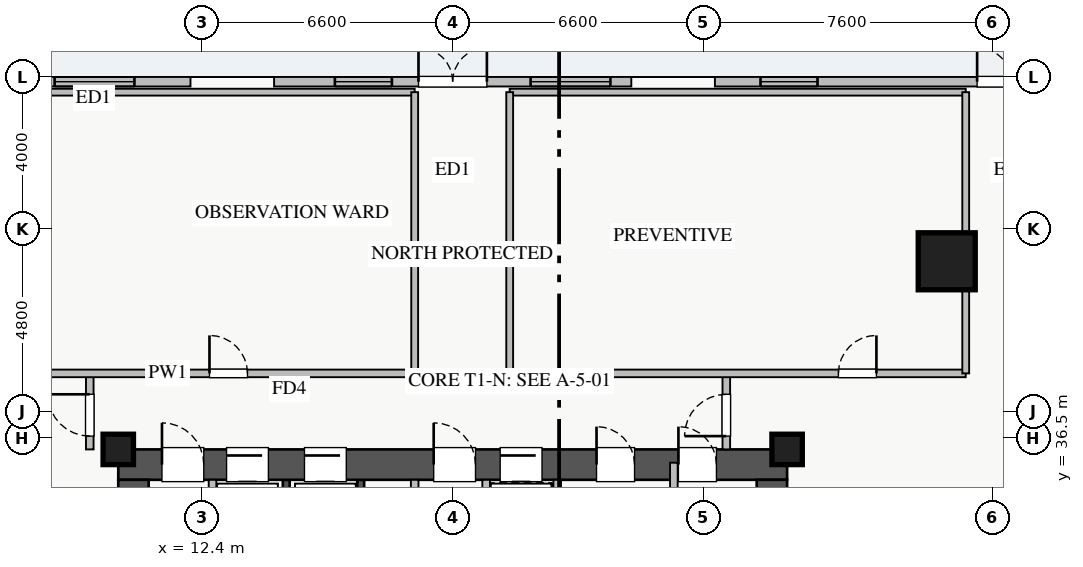
"""IFC4 building model, lengths in metres.
Left out: names, types, materials, properties, quantities, classifications, styles, units other than length and angle.
Written with IfcOpenShell. Run it as: python <this file> out.ifc"""

import sys

from ifc_helpers import new_model, si_unit, direction, frame, frame_2d, origin, origin_2d, place, context, subcontext, project, spatial, rectangle, extrude, source, transform, mapped, element, fill, save


model = new_model("IFC4")
c1 = context("Model", 3, precision=1e-05, world=origin(), true_north=direction((0.0, 1.0)))
c2 = subcontext(c1, "Body", "Model", "MODEL_VIEW")
j1 = project(units=[si_unit("LENGTHUNIT", "METRE"), si_unit("PLANEANGLEUNIT", "RADIAN")], contexts=[c1])
p1 = place(None, origin())
s1 = spatial("IfcSite", under=j1, at=p1, CompositionType="ELEMENT")
p2 = place(p1, origin())
s2 = spatial("IfcBuilding", under=s1, at=p2, CompositionType="ELEMENT")
p3 = place(p2, origin())
s3 = spatial("IfcBuildingStorey", under=s2, at=p3, CompositionType="ELEMENT", Elevation=0.0)
for number, where, z_axis, x_axis in (
    (1, (14.62, 33.2, 0.0), (0.0, 0.0, 1.0), (0.0, 1.0, 0.0)),
    (2, (16.58, 33.2, 0.0), (0.0, 0.0, 1.0), (0.0, 1.0, 0.0)),
):
    element("IfcWall", number, at=place(p3, frame(where, z_axis=z_axis, x_axis=x_axis)), inside=s3, PredefinedType="SHEAR", context=c2, shape_type="SweptSolid", body=[
        extrude(rectangle(XDim=2.2, YDim=0.18, at=frame_2d((1.1, 0.0))), origin(), (0.0, 0.0, 1.0), 4.78),
    ])
p4 = place(p3, frame((10.2, 35.8, 0.0), z_axis=(0.0, 0.0, 1.0), x_axis=(1.0, 0.0, 0.0)))
e3 = element("IfcWall", 3, at=p4, inside=s3, PredefinedType="SHEAR", context=c2, shape_type="SweptSolid", body=[
    extrude(rectangle(XDim=17.6, YDim=0.8, at=frame_2d((8.8, 0.0))), origin(), (0.0, 0.0, 1.0), 5.0),
])
p5 = place(p4, frame((1.15, 0.0, 0.0)))
e4 = element("IfcOpeningElement", 4, at=p5, cuts=e3, PredefinedType="OPENING", context=c2, shape_type="SweptSolid", body=[
    extrude(rectangle(XDim=1.1, YDim=2.05, at=frame_2d((0.55, 1.025))), frame((0.0, 0.41, 0.0), z_axis=(0.0, -1.0, 0.0), x_axis=(1.0, 0.0, 0.0)), (0.0, 0.0, 1.0), 0.82),
])
p6 = place(p4, frame((8.3, 0.0, 0.0)))
e5 = element("IfcOpeningElement", 5, at=p6, cuts=e3, PredefinedType="OPENING", context=c2, shape_type="SweptSolid", body=[
    extrude(rectangle(XDim=1.1, YDim=2.05, at=frame_2d((0.55, 1.025))), frame((0.0, 0.41, 0.0), z_axis=(0.0, -1.0, 0.0), x_axis=(1.0, 0.0, 0.0)), (0.0, 0.0, 1.0), 0.82),
])
p7 = place(p4, frame((10.05, 0.0, 0.0)))
e6 = element("IfcOpeningElement", 6, at=p7, cuts=e3, PredefinedType="OPENING", context=c2, shape_type="SweptSolid", body=[
    extrude(rectangle(XDim=1.1, YDim=2.05, at=frame_2d((0.55, 1.025))), frame((0.0, 0.41, 0.0), z_axis=(0.0, -1.0, 0.0), x_axis=(1.0, 0.0, 0.0)), (0.0, 0.0, 1.0), 0.82),
])
p8 = place(p4, frame((4.9, 0.0, 0.0)))
e7 = element("IfcOpeningElement", 7, at=p8, cuts=e3, PredefinedType="OPENING", context=c2, shape_type="SweptSolid", body=[
    extrude(rectangle(XDim=1.1, YDim=2.05, at=frame_2d((0.55, 1.025))), frame((0.0, 0.41, 0.0), z_axis=(0.0, -1.0, 0.0), x_axis=(1.0, 0.0, 0.0)), (0.0, 0.0, 1.0), 0.82),
])
p9 = place(p4, frame((2.85, 0.0, 0.0)))
e8 = element("IfcOpeningElement", 8, at=p9, cuts=e3, PredefinedType="OPENING", context=c2, shape_type="SweptSolid", body=[
    extrude(rectangle(XDim=1.1, YDim=2.05, at=frame_2d((0.55, 1.025))), frame((0.0, 0.41, 0.0), z_axis=(0.0, -1.0, 0.0), x_axis=(1.0, 0.0, 0.0)), (0.0, 0.0, 1.0), 0.82),
])
p10 = place(p4, frame((14.74, 0.0, 0.0)))
e9 = element("IfcOpeningElement", 9, at=p10, cuts=e3, PredefinedType="OPENING", context=c2, shape_type="SweptSolid", body=[
    extrude(rectangle(XDim=1.0, YDim=2.05, at=frame_2d((0.5, 1.025))), frame((0.0, 0.41, 0.0), z_axis=(0.0, -1.0, 0.0), x_axis=(1.0, 0.0, 0.0)), (0.0, 0.0, 1.0), 0.82),
])
p11 = place(p4, frame((12.585, 0.0, 0.0)))
e10 = element("IfcOpeningElement", 10, at=p11, cuts=e3, PredefinedType="OPENING", context=c2, shape_type="SweptSolid", body=[
    extrude(rectangle(XDim=1.0, YDim=2.05, at=frame_2d((0.5, 1.025))), frame((0.0, 0.41, 0.0), z_axis=(0.0, -1.0, 0.0), x_axis=(1.0, 0.0, 0.0)), (0.0, 0.0, 1.0), 0.82),
])
p12 = place(p3, frame((10.6, 29.8, 0.0), z_axis=(0.0, 0.0, 1.0), x_axis=(0.0, 1.0, 0.0)))
e11 = element("IfcWall", 11, at=p12, inside=s3, PredefinedType="SHEAR", context=c2, shape_type="SweptSolid", body=[
    extrude(rectangle(XDim=5.6, YDim=0.8, at=frame_2d((2.8, 0.0))), origin(), (0.0, 0.0, 1.0), 5.0),
])
p13 = place(p3, frame((27.4, 29.8, 0.0), z_axis=(0.0, 0.0, 1.0), x_axis=(0.0, 1.0, 0.0)))
e12 = element("IfcWall", 12, at=p13, inside=s3, PredefinedType="SHEAR", context=c2, shape_type="SweptSolid", body=[
    extrude(rectangle(XDim=5.6, YDim=0.8, at=frame_2d((2.8, 0.0))), origin(), (0.0, 0.0, 1.0), 5.0),
])
p14 = place(p13, frame((1.1, 0.0, 0.0)))
e13 = element("IfcOpeningElement", 13, at=p14, cuts=e12, PredefinedType="OPENING", context=c2, shape_type="SweptSolid", body=[
    extrude(rectangle(XDim=1.3, YDim=2.05, at=frame_2d((0.65, 1.025))), frame((0.0, 0.41, 0.0), z_axis=(0.0, -1.0, 0.0), x_axis=(1.0, 0.0, 0.0)), (0.0, 0.0, 1.0), 0.82),
])
m1 = source(origin(), c2, "Body", "SweptSolid", [
    extrude(rectangle(XDim=1.5, YDim=1.5, at=origin_2d()), origin(), (0.0, 0.0, 1.0), 5.0),
])
p15 = place(p3, frame((32.0, 41.15, 0.0), z_axis=(0.0, 0.0, 1.0), x_axis=(1.0, 0.0, 0.0)))
e14 = element("IfcColumn", 14, at=p15, inside=s3, PredefinedType="COLUMN", context=c2, shape_type="MappedRepresentation", body=[
    mapped(m1, transform((0.0, 0.0, 0.0), x_axis=(1.0, 0.0, 0.0), y_axis=(0.0, 1.0, 0.0), z_axis=(0.0, 0.0, 1.0), scale=1.0)),
])
m2 = source(origin(), c2, "Body", "SweptSolid", [
    extrude(rectangle(XDim=0.8, YDim=0.8, at=origin_2d()), origin(), (0.0, 0.0, 1.0), 5.0),
])
for number, where, z_axis, x_axis in (
    (15, (10.2, 36.2, 0.0), (0.0, 0.0, 1.0), (1.0, 0.0, 0.0)),
    (16, (27.8, 36.2, 0.0), (0.0, 0.0, 1.0), (1.0, 0.0, 0.0)),
):
    element("IfcColumn", number, at=place(p3, frame(where, z_axis=z_axis, x_axis=x_axis)), inside=s3, PredefinedType="PILASTER", context=c2, shape_type="MappedRepresentation", body=[
        mapped(m2, transform((0.0, 0.0, 0.0), x_axis=(1.0, 0.0, 0.0), y_axis=(0.0, 1.0, 0.0), z_axis=(0.0, 0.0, 1.0), scale=1.0)),
    ])
p16 = place(p3, frame((2.0, 45.875, 0.0), z_axis=(0.0, 0.0, 1.0), x_axis=(1.0, 0.0, 0.0)))
e17 = element("IfcWall", 17, at=p16, inside=s3, PredefinedType="STANDARD", context=c2, shape_type="SweptSolid", body=[
    extrude(rectangle(XDim=10.1, YDim=0.25, at=frame_2d((5.05, 0.0))), origin(), (0.0, 0.0, 1.0), 4.32),
])
p17 = place(p16, frame((4.15, 0.0, 0.0)))
e18 = element("IfcOpeningElement", 18, at=p17, cuts=e17, PredefinedType="OPENING", context=c2, shape_type="SweptSolid", body=[
    extrude(rectangle(XDim=1.8, YDim=2.2, at=frame_2d((0.9, 1.1))), frame((0.0, 0.135, 0.0), z_axis=(0.0, -1.0, 0.0), x_axis=(1.0, 0.0, 0.0)), (0.0, 0.0, 1.0), 0.27),
])
p18 = place(p16, frame((1.775, 0.0, 0.9)))
e19 = element("IfcOpeningElement", 19, at=p18, cuts=e17, PredefinedType="OPENING", context=c2, shape_type="SweptSolid", body=[
    extrude(rectangle(XDim=1.5, YDim=1.45, at=frame_2d((0.75, 0.725))), frame((0.0, 0.135, 0.0), z_axis=(0.0, -1.0, 0.0), x_axis=(1.0, 0.0, 0.0)), (0.0, 0.0, 1.0), 0.27),
])
p19 = place(p16, frame((6.525, 0.0, 0.9)))
e20 = element("IfcOpeningElement", 20, at=p19, cuts=e17, PredefinedType="OPENING", context=c2, shape_type="SweptSolid", body=[
    extrude(rectangle(XDim=2.1, YDim=1.48, at=frame_2d((1.05, 0.74))), frame((0.0, 0.135, 0.0), z_axis=(0.0, -1.0, 0.0), x_axis=(1.0, 0.0, 0.0)), (0.0, 0.0, 1.0), 0.27),
])
p20 = place(p3, frame((14.3, 45.875, 0.0), z_axis=(0.0, 0.0, 1.0), x_axis=(1.0, 0.0, 0.0)))
e21 = element("IfcWall", 21, at=p20, inside=s3, PredefinedType="STANDARD", context=c2, shape_type="SweptSolid", body=[
    extrude(rectangle(XDim=9.4, YDim=0.25, at=frame_2d((4.7, 0.0))), origin(), (0.0, 0.0, 1.0), 4.32),
])
p21 = place(p20, frame((3.8, 0.0, 0.0)))
e22 = element("IfcOpeningElement", 22, at=p21, cuts=e21, PredefinedType="OPENING", context=c2, shape_type="SweptSolid", body=[
    extrude(rectangle(XDim=1.8, YDim=2.2, at=frame_2d((0.9, 1.1))), frame((0.0, 0.135, 0.0), z_axis=(0.0, -1.0, 0.0), x_axis=(1.0, 0.0, 0.0)), (0.0, 0.0, 1.0), 0.27),
])
p22 = place(p20, frame((1.6, 0.0, 0.9)))
e23 = element("IfcOpeningElement", 23, at=p22, cuts=e21, PredefinedType="OPENING", context=c2, shape_type="SweptSolid", body=[
    extrude(rectangle(XDim=1.5, YDim=1.45, at=frame_2d((0.75, 0.725))), frame((0.0, 0.135, 0.0), z_axis=(0.0, -1.0, 0.0), x_axis=(1.0, 0.0, 0.0)), (0.0, 0.0, 1.0), 0.27),
])
p23 = place(p20, frame((6.75, 0.0, 0.9)))
e24 = element("IfcOpeningElement", 24, at=p23, cuts=e21, PredefinedType="OPENING", context=c2, shape_type="SweptSolid", body=[
    extrude(rectangle(XDim=2.1, YDim=1.5, at=frame_2d((1.05, 0.75))), frame((0.0, 0.135, 0.0), z_axis=(0.0, -1.0, 0.0), x_axis=(1.0, 0.0, 0.0)), (0.0, 0.0, 1.0), 0.27),
])
p24 = place(p3, frame((25.9, 45.875, 0.0), z_axis=(0.0, 0.0, 1.0), x_axis=(1.0, 0.0, 0.0)))
e25 = element("IfcWall", 25, at=p24, inside=s3, PredefinedType="STANDARD", context=c2, shape_type="SweptSolid", body=[
    extrude(rectangle(XDim=15.6, YDim=0.25, at=frame_2d((7.8, 0.0))), origin(), (0.0, 0.0, 1.0), 4.32),
])
p25 = place(p24, frame((6.9, 0.0, 0.0)))
e26 = element("IfcOpeningElement", 26, at=p25, cuts=e25, PredefinedType="OPENING", context=c2, shape_type="SweptSolid", body=[
    extrude(rectangle(XDim=1.8, YDim=2.2, at=frame_2d((0.9, 1.1))), frame((0.0, 0.135, 0.0), z_axis=(0.0, -1.0, 0.0), x_axis=(1.0, 0.0, 0.0)), (0.0, 0.0, 1.0), 0.27),
])
p26 = place(p24, frame((1.2, 0.0, 0.9)))
e27 = element("IfcOpeningElement", 27, at=p26, cuts=e25, PredefinedType="OPENING", context=c2, shape_type="SweptSolid", body=[
    extrude(rectangle(XDim=1.5, YDim=1.45, at=frame_2d((0.75, 0.725))), frame((0.0, 0.135, 0.0), z_axis=(0.0, -1.0, 0.0), x_axis=(1.0, 0.0, 0.0)), (0.0, 0.0, 1.0), 0.27),
])
p27 = place(p24, frame((12.75, 0.0, 0.9)))
e28 = element("IfcOpeningElement", 28, at=p27, cuts=e25, PredefinedType="OPENING", context=c2, shape_type="SweptSolid", body=[
    extrude(rectangle(XDim=1.8, YDim=1.45, at=frame_2d((0.9, 0.725))), frame((0.0, 0.135, 0.0), z_axis=(0.0, -1.0, 0.0), x_axis=(1.0, 0.0, 0.0)), (0.0, 0.0, 1.0), 0.27),
])
for number, where, z_axis, x_axis in (
    (29, (12.68, 33.19, 0.0), (0.0, 0.0, 1.0), (0.0, 1.0, 0.0)),
    (30, (18.0, 33.19, 0.0), (0.0, 0.0, 1.0), (0.0, 1.0, 0.0)),
    (31, (19.88, 33.19, 0.0), (0.0, 0.0, 1.0), (0.0, 1.0, 0.0)),
):
    element("IfcWall", number, at=place(p3, frame(where, z_axis=z_axis, x_axis=x_axis)), inside=s3, PredefinedType="PARTITIONING", context=c2, shape_type="SweptSolid", body=[
        extrude(rectangle(XDim=2.21, YDim=0.2, at=frame_2d((1.105, 0.0))), origin(), (0.0, 0.0, 1.0), 4.78),
    ])
p28 = place(p3, frame((24.82, 33.2, 0.0), z_axis=(0.0, 0.0, 1.0), x_axis=(0.0, 1.0, 0.0)))
e32 = element("IfcWall", 32, at=p28, inside=s3, PredefinedType="PARTITIONING", context=c2, shape_type="SweptSolid", body=[
    extrude(rectangle(XDim=2.65, YDim=0.2, at=frame_2d((1.325, 0.0))), origin(), (0.0, 0.0, 1.0), 4.78),
])
p29 = place(p3, frame((21.75, 33.2, 0.0), z_axis=(0.0, 0.0, 1.0), x_axis=(0.0, 1.0, 0.0)))
e33 = element("IfcWall", 33, at=p29, inside=s3, PredefinedType="PARTITIONING", context=c2, shape_type="SweptSolid", body=[
    extrude(rectangle(XDim=2.2, YDim=0.2, at=frame_2d((1.1, 0.0))), origin(), (0.0, 0.0, 1.0), 4.78),
])
p30 = place(p3, frame((9.45, 36.2, 0.0), z_axis=(0.0, 0.0, 1.0), x_axis=(0.0, 1.0, 0.0)))
e34 = element("IfcWall", 34, at=p30, inside=s3, PredefinedType="PARTITIONING", context=c2, shape_type="SweptSolid", body=[
    extrude(rectangle(XDim=2.0, YDim=0.2, at=frame_2d((1.0, 0.0))), origin(), (0.0, 0.0, 1.0), 4.78),
])
p31 = place(p30, frame((0.35, 0.0, 0.0)))
e35 = element("IfcOpeningElement", 35, at=p31, cuts=e34, PredefinedType="OPENING", context=c2, shape_type="SweptSolid", body=[
    extrude(rectangle(XDim=1.1, YDim=2.05, at=frame_2d((0.55, 1.025))), frame((0.0, 0.11, 0.0), z_axis=(0.0, -1.0, 0.0), x_axis=(1.0, 0.0, 0.0)), (0.0, 0.0, 1.0), 0.22),
])
p32 = place(p3, frame((26.2, 36.2, 0.0), z_axis=(0.0, 0.0, 1.0), x_axis=(0.0, 1.0, 0.0)))
e36 = element("IfcWall", 36, at=p32, inside=s3, PredefinedType="PARTITIONING", context=c2, shape_type="SweptSolid", body=[
    extrude(rectangle(XDim=2.0, YDim=0.2, at=frame_2d((1.0, 0.0))), origin(), (0.0, 0.0, 1.0), 4.78),
])
p33 = place(p32, frame((0.35, 0.0, 0.0)))
e37 = element("IfcOpeningElement", 37, at=p33, cuts=e36, PredefinedType="OPENING", context=c2, shape_type="SweptSolid", body=[
    extrude(rectangle(XDim=1.1, YDim=2.05, at=frame_2d((0.55, 1.025))), frame((0.0, 0.11, 0.0), z_axis=(0.0, -1.0, 0.0), x_axis=(1.0, 0.0, 0.0)), (0.0, 0.0, 1.0), 0.22),
])
p34 = place(p3, frame((8.2, 38.2, 0.0), z_axis=(0.0, 0.0, 1.0), x_axis=(1.0, 0.0, 0.0)))
e38 = element("IfcWall", 38, at=p34, inside=s3, PredefinedType="PARTITIONING", context=c2, shape_type="SweptSolid", body=[
    extrude(rectangle(XDim=9.8, YDim=0.2, at=frame_2d((4.9, 0.0))), origin(), (0.0, 0.0, 1.0), 4.78),
])
p35 = place(p34, frame((4.4, 0.0, 0.0)))
e39 = element("IfcOpeningElement", 39, at=p35, cuts=e38, PredefinedType="OPENING", context=c2, shape_type="SweptSolid", body=[
    extrude(rectangle(XDim=1.0, YDim=2.05, at=frame_2d((0.5, 1.025))), frame((0.0, 0.11, 0.0), z_axis=(0.0, -1.0, 0.0), x_axis=(1.0, 0.0, 0.0)), (0.0, 0.0, 1.0), 0.22),
])
p36 = place(p3, frame((20.5, 38.2, 0.0), z_axis=(0.0, 0.0, 1.0), x_axis=(1.0, 0.0, 0.0)))
e40 = element("IfcWall", 40, at=p36, inside=s3, PredefinedType="PARTITIONING", context=c2, shape_type="SweptSolid", body=[
    extrude(rectangle(XDim=12.0, YDim=0.2, at=frame_2d((6.0, 0.0))), origin(), (0.0, 0.0, 1.0), 4.78),
])
p37 = place(p36, frame((8.65, 0.0, 0.0)))
e41 = element("IfcOpeningElement", 41, at=p37, cuts=e40, PredefinedType="OPENING", context=c2, shape_type="SweptSolid", body=[
    extrude(rectangle(XDim=1.0, YDim=2.05, at=frame_2d((0.5, 1.025))), frame((0.0, 0.11, 0.0), z_axis=(0.0, -1.0, 0.0), x_axis=(1.0, 0.0, 0.0)), (0.0, 0.0, 1.0), 0.22),
])
p38 = place(p3, frame((8.2, 45.6, 0.0), z_axis=(0.0, 0.0, 1.0), x_axis=(1.0, 0.0, 0.0)))
e42 = element("IfcWall", 42, at=p38, inside=s3, PredefinedType="PARTITIONING", context=c2, shape_type="SweptSolid", body=[
    extrude(rectangle(XDim=9.8, YDim=0.18, at=frame_2d((4.9, 0.0))), origin(), (0.0, 0.0, 1.0), 4.78),
])
p39 = place(p3, frame((18.0, 38.2, 0.0), z_axis=(0.0, 0.0, 1.0), x_axis=(0.0, 1.0, 0.0)))
e43 = element("IfcWall", 43, at=p39, inside=s3, PredefinedType="PARTITIONING", context=c2, shape_type="SweptSolid", body=[
    extrude(rectangle(XDim=7.4, YDim=0.18, at=frame_2d((3.7, 0.0))), origin(), (0.0, 0.0, 1.0), 4.78),
])
p40 = place(p3, frame((20.5, 45.6, 0.0), z_axis=(0.0, 0.0, 1.0), x_axis=(1.0, 0.0, 0.0)))
e44 = element("IfcWall", 44, at=p40, inside=s3, PredefinedType="PARTITIONING", context=c2, shape_type="SweptSolid", body=[
    extrude(rectangle(XDim=12.0, YDim=0.18, at=frame_2d((6.0, 0.0))), origin(), (0.0, 0.0, 1.0), 4.78),
])
for number, where, z_axis, x_axis in (
    (45, (20.5, 38.2, 0.0), (0.0, 0.0, 1.0), (0.0, 1.0, 0.0)),
    (46, (32.5, 38.2, 0.0), (0.0, 0.0, 1.0), (0.0, 1.0, 0.0)),
):
    element("IfcWall", number, at=place(p3, frame(where, z_axis=z_axis, x_axis=x_axis)), inside=s3, PredefinedType="PARTITIONING", context=c2, shape_type="SweptSolid", body=[
        extrude(rectangle(XDim=7.4, YDim=0.18, at=frame_2d((3.7, 0.0))), origin(), (0.0, 0.0, 1.0), 4.78),
    ])
m3 = source(origin(), c2, "Body", "SweptSolid", [
    extrude(rectangle(XDim=2.1, YDim=1.48, at=frame_2d((1.05, 0.74))), frame((0.0, 0.03, 0.0), z_axis=(0.0, -1.0, 0.0), x_axis=(1.0, 0.0, 0.0)), (0.0, 0.0, 1.0), 0.06),
])
p41 = place(p19, origin())
e47 = element("IfcWindow", 47, at=p41, inside=s3, PartitioningType="TRIPLE_PANEL_VERTICAL", PredefinedType="WINDOW", context=c2, shape_type="MappedRepresentation", body=[
    mapped(m3, transform((0.0, 0.0, 0.0), x_axis=(1.0, 0.0, 0.0), y_axis=(0.0, 1.0, 0.0), z_axis=(0.0, 0.0, 1.0), scale=1.0)),
])
fill(e20, e47)
m4 = source(origin(), c2, "Body", "SweptSolid", [
    extrude(rectangle(XDim=1.8, YDim=2.2, at=frame_2d((0.9, 1.1))), frame((0.0, 0.025, 0.0), z_axis=(0.0, -1.0, 0.0), x_axis=(1.0, 0.0, 0.0)), (0.0, 0.0, 1.0), 0.05),
])
p42 = place(p21, origin())
e48 = element("IfcDoor", 48, at=p42, inside=s3, OperationType="DOUBLE_DOOR_SINGLE_SWING", PredefinedType="DOOR", context=c2, shape_type="MappedRepresentation", body=[
    mapped(m4, transform((0.0, 0.0, 0.0), x_axis=(1.0, 0.0, 0.0), y_axis=(0.0, 1.0, 0.0), z_axis=(0.0, 0.0, 1.0), scale=1.0)),
])
fill(e22, e48)
m5 = source(origin(), c2, "Body", "SweptSolid", [
    extrude(rectangle(XDim=1.5, YDim=1.45, at=frame_2d((0.75, 0.725))), frame((0.0, 0.03, 0.0), z_axis=(0.0, -1.0, 0.0), x_axis=(1.0, 0.0, 0.0)), (0.0, 0.0, 1.0), 0.06),
])
p43 = place(p22, origin())
e49 = element("IfcWindow", 49, at=p43, inside=s3, PartitioningType="DOUBLE_PANEL_VERTICAL", PredefinedType="WINDOW", context=c2, shape_type="MappedRepresentation", body=[
    mapped(m5, transform((0.0, 0.0, 0.0), x_axis=(1.0, 0.0, 0.0), y_axis=(0.0, 1.0, 0.0), z_axis=(0.0, 0.0, 1.0), scale=1.0)),
])
fill(e23, e49)
m6 = source(origin(), c2, "Body", "SweptSolid", [
    extrude(rectangle(XDim=2.1, YDim=1.5, at=frame_2d((1.05, 0.75))), frame((0.0, 0.03, 0.0), z_axis=(0.0, -1.0, 0.0), x_axis=(1.0, 0.0, 0.0)), (0.0, 0.0, 1.0), 0.06),
])
p44 = place(p23, origin())
e50 = element("IfcWindow", 50, at=p44, inside=s3, PartitioningType="TRIPLE_PANEL_VERTICAL", PredefinedType="WINDOW", context=c2, shape_type="MappedRepresentation", body=[
    mapped(m6, transform((0.0, 0.0, 0.0), x_axis=(1.0, 0.0, 0.0), y_axis=(0.0, 1.0, 0.0), z_axis=(0.0, 0.0, 1.0), scale=1.0)),
])
fill(e24, e50)
p45 = place(p25, origin())
e51 = element("IfcDoor", 51, at=p45, inside=s3, OperationType="DOUBLE_DOOR_SINGLE_SWING", PredefinedType="DOOR", context=c2, shape_type="MappedRepresentation", body=[
    mapped(m4, transform((0.0, 0.0, 0.0), x_axis=(1.0, 0.0, 0.0), y_axis=(0.0, 1.0, 0.0), z_axis=(0.0, 0.0, 1.0), scale=1.0)),
])
fill(e26, e51)
p46 = place(p26, origin())
e52 = element("IfcWindow", 52, at=p46, inside=s3, PartitioningType="DOUBLE_PANEL_VERTICAL", PredefinedType="WINDOW", context=c2, shape_type="MappedRepresentation", body=[
    mapped(m5, transform((0.0, 0.0, 0.0), x_axis=(1.0, 0.0, 0.0), y_axis=(0.0, 1.0, 0.0), z_axis=(0.0, 0.0, 1.0), scale=1.0)),
])
fill(e27, e52)
m7 = source(origin(), c2, "Body", "SweptSolid", [
    extrude(rectangle(XDim=1.1, YDim=2.05, at=frame_2d((0.55, 1.025))), frame((0.0, 0.025, 0.0), z_axis=(0.0, -1.0, 0.0), x_axis=(1.0, 0.0, 0.0)), (0.0, 0.0, 1.0), 0.05),
])
p47 = place(p5, origin())
e53 = element("IfcDoor", 53, at=p47, inside=s3, OperationType="SINGLE_SWING_LEFT", PredefinedType="DOOR", context=c2, shape_type="MappedRepresentation", body=[
    mapped(m7, transform((0.0, 0.0, 0.0), x_axis=(1.0, 0.0, 0.0), y_axis=(0.0, 1.0, 0.0), z_axis=(0.0, 0.0, 1.0), scale=1.0)),
])
fill(e4, e53)
p48 = place(p6, origin())
e54 = element("IfcDoor", 54, at=p48, inside=s3, OperationType="SINGLE_SWING_LEFT", PredefinedType="DOOR", context=c2, shape_type="MappedRepresentation", body=[
    mapped(m7, transform((0.0, 0.0, 0.0), x_axis=(1.0, 0.0, 0.0), y_axis=(0.0, 1.0, 0.0), z_axis=(0.0, 0.0, 1.0), scale=1.0)),
])
fill(e5, e54)
p49 = place(p7, origin())
e55 = element("IfcDoor", 55, at=p49, inside=s3, OperationType="SLIDING_TO_LEFT", PredefinedType="DOOR", context=c2, shape_type="MappedRepresentation", body=[
    mapped(m7, transform((0.0, 0.0, 0.0), x_axis=(1.0, 0.0, 0.0), y_axis=(0.0, 1.0, 0.0), z_axis=(0.0, 0.0, 1.0), scale=1.0)),
])
fill(e6, e55)
p50 = place(p8, origin())
e56 = element("IfcDoor", 56, at=p50, inside=s3, OperationType="SLIDING_TO_LEFT", PredefinedType="DOOR", context=c2, shape_type="MappedRepresentation", body=[
    mapped(m7, transform((0.0, 0.0, 0.0), x_axis=(1.0, 0.0, 0.0), y_axis=(0.0, 1.0, 0.0), z_axis=(0.0, 0.0, 1.0), scale=1.0)),
])
fill(e7, e56)
p51 = place(p9, origin())
e57 = element("IfcDoor", 57, at=p51, inside=s3, OperationType="SLIDING_TO_LEFT", PredefinedType="DOOR", context=c2, shape_type="MappedRepresentation", body=[
    mapped(m7, transform((0.0, 0.0, 0.0), x_axis=(1.0, 0.0, 0.0), y_axis=(0.0, 1.0, 0.0), z_axis=(0.0, 0.0, 1.0), scale=1.0)),
])
fill(e8, e57)
m8 = source(origin(), c2, "Body", "SweptSolid", [
    extrude(rectangle(XDim=1.0, YDim=2.05, at=frame_2d((0.5, 1.025))), frame((0.0, 0.025, 0.0), z_axis=(0.0, -1.0, 0.0), x_axis=(1.0, 0.0, 0.0)), (0.0, 0.0, 1.0), 0.05),
])
p52 = place(p10, origin())
e58 = element("IfcDoor", 58, at=p52, inside=s3, OperationType="SINGLE_SWING_LEFT", PredefinedType="DOOR", context=c2, shape_type="MappedRepresentation", body=[
    mapped(m8, transform((0.0, 0.0, 0.0), x_axis=(1.0, 0.0, 0.0), y_axis=(0.0, 1.0, 0.0), z_axis=(0.0, 0.0, 1.0), scale=1.0)),
])
fill(e9, e58)
p53 = place(p11, origin())
e59 = element("IfcDoor", 59, at=p53, inside=s3, OperationType="SINGLE_SWING_LEFT", PredefinedType="DOOR", context=c2, shape_type="MappedRepresentation", body=[
    mapped(m8, transform((0.0, 0.0, 0.0), x_axis=(1.0, 0.0, 0.0), y_axis=(0.0, 1.0, 0.0), z_axis=(0.0, 0.0, 1.0), scale=1.0)),
])
fill(e10, e59)
p54 = place(p31, origin())
e60 = element("IfcDoor", 60, at=p54, inside=s3, OperationType="SINGLE_SWING_RIGHT", PredefinedType="DOOR", context=c2, shape_type="MappedRepresentation", body=[
    mapped(m7, transform((0.0, 0.0, 0.0), x_axis=(1.0, 0.0, 0.0), y_axis=(0.0, 1.0, 0.0), z_axis=(0.0, 0.0, 1.0), scale=1.0)),
])
fill(e35, e60)
p55 = place(p33, origin())
e61 = element("IfcDoor", 61, at=p55, inside=s3, OperationType="SINGLE_SWING_LEFT", PredefinedType="DOOR", context=c2, shape_type="MappedRepresentation", body=[
    mapped(m7, transform((0.0, 0.0, 0.0), x_axis=(1.0, 0.0, 0.0), y_axis=(0.0, 1.0, 0.0), z_axis=(0.0, 0.0, 1.0), scale=1.0)),
])
fill(e37, e61)
p56 = place(p35, origin())
e62 = element("IfcDoor", 62, at=p56, inside=s3, OperationType="SINGLE_SWING_LEFT", PredefinedType="DOOR", context=c2, shape_type="MappedRepresentation", body=[
    mapped(m8, transform((0.0, 0.0, 0.0), x_axis=(1.0, 0.0, 0.0), y_axis=(0.0, 1.0, 0.0), z_axis=(0.0, 0.0, 1.0), scale=1.0)),
])
fill(e39, e62)
p57 = place(p37, origin())
e63 = element("IfcDoor", 63, at=p57, inside=s3, OperationType="SINGLE_SWING_RIGHT", PredefinedType="DOOR", context=c2, shape_type="MappedRepresentation", body=[
    mapped(m8, transform((0.0, 0.0, 0.0), x_axis=(1.0, 0.0, 0.0), y_axis=(0.0, 1.0, 0.0), z_axis=(0.0, 0.0, 1.0), scale=1.0)),
])
fill(e41, e63)
save(model, sys.argv[1])
